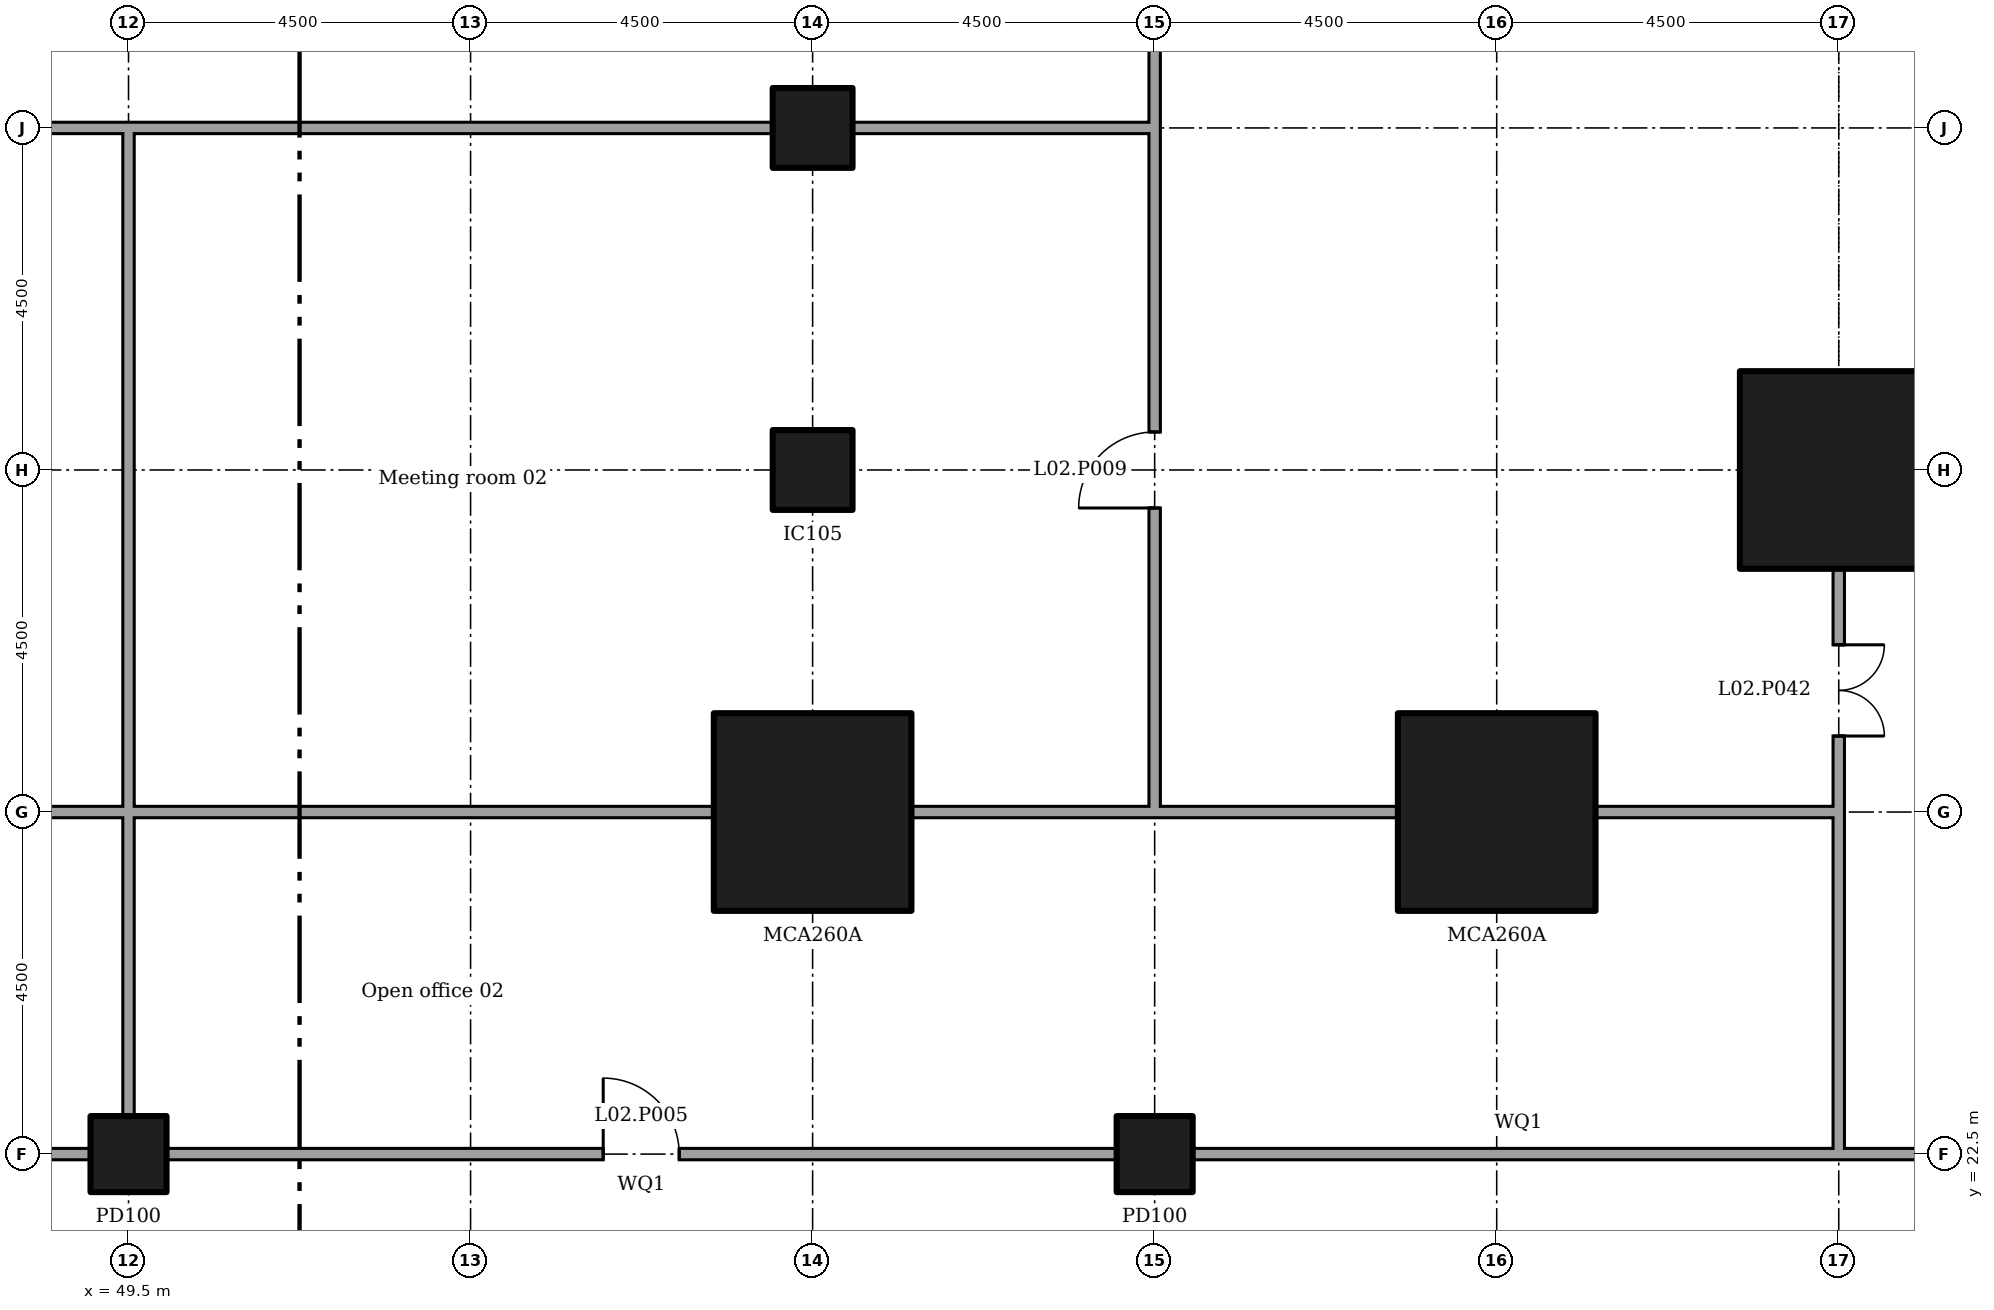
"""IFC4 building model, lengths in metres.
Left out: names, types, materials, properties, quantities, classifications, styles, units other than length and angle.
Written with IfcOpenShell. Run it as: python <this file> out.ifc"""

import sys

from ifc_helpers import new_model, si_unit, direction, frame, frame_2d, origin, origin_2d, place, context, subcontext, project, spatial, rectangle, extrude, element, fill, save


model = new_model("IFC4")
c1 = context("Model", 3, precision=1e-05, world=origin(), true_north=direction((0.0, 1.0)))
c2 = subcontext(c1, "Body", "Model", "MODEL_VIEW")
j1 = project(units=[si_unit("LENGTHUNIT", "METRE"), si_unit("PLANEANGLEUNIT", "RADIAN")], contexts=[c1])
p1 = place(None, origin())
s1 = spatial("IfcSite", under=j1, at=p1, CompositionType="ELEMENT")
p2 = place(p1, origin())
s2 = spatial("IfcBuilding", under=s1, at=p2, CompositionType="ELEMENT")
p3 = place(p2, frame((0.0, 0.0, 11.5)))
s3 = spatial("IfcBuildingStorey", under=s2, at=p3, CompositionType="ELEMENT", Elevation=11.5)
for number, where in (
    (1, (58.5, 27.0, 0.0)),
    (2, (67.5, 27.0, 0.0)),
    (3, (72.0, 31.5, 0.0)),
):
    element("IfcColumn", number, at=place(p3, frame(where)), inside=s3, PredefinedType="COLUMN", context=c2, shape_type="SweptSolid", body=[
        extrude(rectangle(XDim=2.6, YDim=2.6, at=origin_2d()), origin(), (0.0, 0.0, 1.0), 5.0),
    ])
for number, where in (
    (4, (58.5, 31.5, 0.0)),
    (5, (58.5, 36.0, 0.0)),
):
    element("IfcColumn", number, at=place(p3, frame(where)), inside=s3, PredefinedType="COLUMN", context=c2, shape_type="SweptSolid", body=[
        extrude(rectangle(XDim=1.05, YDim=1.05, at=origin_2d()), origin(), (0.0, 0.0, 1.0), 5.0),
    ])
for number, where in (
    (6, (49.5, 22.5, 0.0)),
    (7, (63.0, 22.5, 0.0)),
):
    element("IfcColumn", number, at=place(p3, frame(where)), inside=s3, PredefinedType="COLUMN", context=c2, shape_type="SweptSolid", body=[
        extrude(rectangle(XDim=1.0, YDim=1.0, at=origin_2d()), origin(), (0.0, 0.0, 1.0), 5.0),
    ])
p4 = place(p2, frame((0.0, 0.0, 6.0)))
s4 = spatial("IfcBuildingStorey", under=s2, at=p4, CompositionType="ELEMENT", Elevation=6.0)
p5 = place(p4, frame((72.0, 32.795, 0.0), z_axis=(0.0, 0.0, 1.0), x_axis=(0.0, 1.0, 0.0)))
e8 = element("IfcWall", 8, at=p5, inside=s4, PredefinedType="SOLIDWALL", context=c2, shape_type="SweptSolid", body=[
    extrude(rectangle(XDim=10.91, YDim=0.3, at=frame_2d((5.455, 0.0))), origin(), (0.0, 0.0, 1.0), 10.05),
])
p6 = place(p5, frame((4.55, 0.0, 0.0)))
e9 = element("IfcOpeningElement", 9, at=p6, cuts=e8, PredefinedType="OPENING", context=c2, shape_type="SweptSolid", body=[
    extrude(rectangle(XDim=1.8, YDim=2.1, at=frame_2d((0.9, 1.05))), frame((0.0, 0.16, 0.0), z_axis=(0.0, -1.0, 0.0), x_axis=(1.0, 0.0, 0.0)), (0.0, 0.0, 1.0), 0.32),
])
p7 = place(p3, frame((36.495, 22.5, 0.0)))
e10 = element("IfcWall", 10, at=p7, inside=s3, PredefinedType="PARTITIONING", context=c2, shape_type="SweptSolid", body=[
    extrude(rectangle(XDim=12.51, YDim=0.15, at=frame_2d((6.255, 0.0))), origin(), (0.0, 0.0, 1.0), 4.55),
])
p8 = place(p7, frame((5.75, 0.0, 0.0)))
e11 = element("IfcOpeningElement", 11, at=p8, cuts=e10, PredefinedType="OPENING", context=c2, shape_type="SweptSolid", body=[
    extrude(rectangle(XDim=1.0, YDim=2.1, at=frame_2d((0.5, 1.05))), frame((0.0, 0.085, 0.0), z_axis=(0.0, -1.0, 0.0), x_axis=(1.0, 0.0, 0.0)), (0.0, 0.0, 1.0), 0.17),
])
p9 = place(p3, frame((49.995, 22.5, 0.0)))
e12 = element("IfcWall", 12, at=p9, inside=s3, PredefinedType="PARTITIONING", context=c2, shape_type="SweptSolid", body=[
    extrude(rectangle(XDim=12.51, YDim=0.15, at=frame_2d((6.255, 0.0))), origin(), (0.0, 0.0, 1.0), 4.55),
])
p10 = place(p9, frame((5.75, 0.0, 0.0)))
e13 = element("IfcOpeningElement", 13, at=p10, cuts=e12, PredefinedType="OPENING", context=c2, shape_type="SweptSolid", body=[
    extrude(rectangle(XDim=1.0, YDim=2.1, at=frame_2d((0.5, 1.05))), frame((0.0, 0.085, 0.0), z_axis=(0.0, -1.0, 0.0), x_axis=(1.0, 0.0, 0.0)), (0.0, 0.0, 1.0), 0.17),
])
p11 = place(p3, frame((63.495, 22.5, 0.0)))
e14 = element("IfcWall", 14, at=p11, inside=s3, PredefinedType="PARTITIONING", context=c2, shape_type="SweptSolid", body=[
    extrude(rectangle(XDim=8.58, YDim=0.15, at=frame_2d((4.29, 0.0))), origin(), (0.0, 0.0, 1.0), 4.55),
])
p12 = place(p3, frame((72.0, 22.5, 0.0)))
e15 = element("IfcWall", 15, at=p12, inside=s3, PredefinedType="PARTITIONING", context=c2, shape_type="SweptSolid", body=[
    extrude(rectangle(XDim=4.005, YDim=0.15, at=frame_2d((2.002, 0.0))), origin(), (0.0, 0.0, 1.0), 4.55),
])
p13 = place(p12, frame((1.1, 0.0, 0.0)))
e16 = element("IfcOpeningElement", 16, at=p13, cuts=e15, PredefinedType="OPENING", context=c2, shape_type="SweptSolid", body=[
    extrude(rectangle(XDim=1.8, YDim=2.1, at=frame_2d((0.9, 1.05))), frame((0.0, 0.085, 0.0), z_axis=(0.0, -1.0, 0.0), x_axis=(1.0, 0.0, 0.0)), (0.0, 0.0, 1.0), 0.17),
])
p14 = place(p3, frame((49.5, 22.995, 0.0), z_axis=(0.0, 0.0, 1.0), x_axis=(0.0, 1.0, 0.0)))
e17 = element("IfcWall", 17, at=p14, inside=s3, PredefinedType="PARTITIONING", context=c2, shape_type="SweptSolid", body=[
    extrude(rectangle(XDim=4.08, YDim=0.15, at=frame_2d((2.04, 0.0))), origin(), (0.0, 0.0, 1.0), 4.55),
])
for number, where in (
    (18, (46.295, 27.0, 0.0)),
    (19, (62.925, 27.0, 0.0)),
    (20, (68.795, 27.0, 0.0)),
):
    element("IfcWall", number, at=place(p3, frame(where)), inside=s3, PredefinedType="PARTITIONING", context=c2, shape_type="SweptSolid", body=[
        extrude(rectangle(XDim=3.28, YDim=0.15, at=frame_2d((1.64, 0.0))), origin(), (0.0, 0.0, 1.0), 4.55),
    ])
p15 = place(p3, frame((49.575, 27.0, 0.0)))
e21 = element("IfcWall", 21, at=p15, inside=s3, PredefinedType="PARTITIONING", context=c2, shape_type="SweptSolid", body=[
    extrude(rectangle(XDim=7.63, YDim=0.15, at=frame_2d((3.815, 0.0))), origin(), (0.0, 0.0, 1.0), 4.55),
])
p16 = place(p3, frame((59.795, 27.0, 0.0)))
e22 = element("IfcWall", 22, at=p16, inside=s3, PredefinedType="PARTITIONING", context=c2, shape_type="SweptSolid", body=[
    extrude(rectangle(XDim=3.205, YDim=0.15, at=frame_2d((1.603, 0.0))), origin(), (0.0, 0.0, 1.0), 4.55),
])
p17 = place(p3, frame((72.0, 22.575, 0.0), z_axis=(0.0, 0.0, 1.0), x_axis=(0.0, 1.0, 0.0)))
e23 = element("IfcWall", 23, at=p17, inside=s3, PredefinedType="PARTITIONING", context=c2, shape_type="SweptSolid", body=[
    extrude(rectangle(XDim=4.35, YDim=0.15, at=frame_2d((2.175, 0.0))), origin(), (0.0, 0.0, 1.0), 4.55),
])
p18 = place(p3, frame((63.0, 27.075, 0.0), z_axis=(0.0, 0.0, 1.0), x_axis=(0.0, 1.0, 0.0)))
e24 = element("IfcWall", 24, at=p18, inside=s3, PredefinedType="PARTITIONING", context=c2, shape_type="SweptSolid", body=[
    extrude(rectangle(XDim=9.0, YDim=0.15, at=frame_2d((4.5, 0.0))), origin(), (0.0, 0.0, 1.0), 4.55),
])
p19 = place(p18, frame((3.925, 0.0, 0.0)))
e25 = element("IfcOpeningElement", 25, at=p19, cuts=e24, PredefinedType="OPENING", context=c2, shape_type="SweptSolid", body=[
    extrude(rectangle(XDim=1.0, YDim=2.1, at=frame_2d((0.5, 1.05))), frame((0.0, 0.085, 0.0), z_axis=(0.0, -1.0, 0.0), x_axis=(1.0, 0.0, 0.0)), (0.0, 0.0, 1.0), 0.17),
])
p20 = place(p3, frame((63.0, 36.0, 0.0), z_axis=(0.0, 0.0, 1.0), x_axis=(0.0, 1.0, 0.0)))
e26 = element("IfcWall", 26, at=p20, inside=s3, PredefinedType="PARTITIONING", context=c2, shape_type="SweptSolid", body=[
    extrude(rectangle(XDim=21.98, YDim=0.15, at=frame_2d((10.99, 0.0))), origin(), (0.0, 0.0, 1.0), 4.55),
])
p21 = place(p20, frame((10.1, 0.0, 0.0)))
e27 = element("IfcOpeningElement", 27, at=p21, cuts=e26, PredefinedType="OPENING", context=c2, shape_type="SweptSolid", body=[
    extrude(rectangle(XDim=1.8, YDim=2.1, at=frame_2d((0.9, 1.05))), frame((0.0, 0.085, 0.0), z_axis=(0.0, -1.0, 0.0), x_axis=(1.0, 0.0, 0.0)), (0.0, 0.0, 1.0), 0.17),
])
p22 = place(p3, frame((72.0, 27.0, 0.0), z_axis=(0.0, 0.0, 1.0), x_axis=(0.0, 1.0, 0.0)))
e28 = element("IfcWall", 28, at=p22, inside=s3, PredefinedType="PARTITIONING", context=c2, shape_type="SweptSolid", body=[
    extrude(rectangle(XDim=3.205, YDim=0.15, at=frame_2d((1.603, 0.0))), origin(), (0.0, 0.0, 1.0), 4.55),
])
p23 = place(p22, frame((1.0, 0.0, 0.0)))
e29 = element("IfcOpeningElement", 29, at=p23, cuts=e28, PredefinedType="OPENING", context=c2, shape_type="SweptSolid", body=[
    extrude(rectangle(XDim=1.2, YDim=2.1, at=frame_2d((0.6, 1.05))), frame((0.0, 0.085, 0.0), z_axis=(0.0, -1.0, 0.0), x_axis=(1.0, 0.0, 0.0)), (0.0, 0.0, 1.0), 0.17),
])
p24 = place(p3, frame((49.5, 27.075, 0.0), z_axis=(0.0, 0.0, 1.0), x_axis=(0.0, 1.0, 0.0)))
e30 = element("IfcWall", 30, at=p24, inside=s3, PredefinedType="PARTITIONING", context=c2, shape_type="SweptSolid", body=[
    extrude(rectangle(XDim=9.0, YDim=0.15, at=frame_2d((4.5, 0.0))), origin(), (0.0, 0.0, 1.0), 4.55),
])
p25 = place(p3, frame((36.075, 36.0, 0.0)))
e31 = element("IfcWall", 31, at=p25, inside=s3, PredefinedType="PARTITIONING", context=c2, shape_type="SweptSolid", body=[
    extrude(rectangle(XDim=13.425, YDim=0.15, at=frame_2d((6.712, 0.0))), origin(), (0.0, 0.0, 1.0), 4.55),
])
p26 = place(p25, frame((6.175, 0.0, 0.0)))
e32 = element("IfcOpeningElement", 32, at=p26, cuts=e31, PredefinedType="OPENING", context=c2, shape_type="SweptSolid", body=[
    extrude(rectangle(XDim=1.0, YDim=2.1, at=frame_2d((0.5, 1.05))), frame((0.0, 0.085, 0.0), z_axis=(0.0, -1.0, 0.0), x_axis=(1.0, 0.0, 0.0)), (0.0, 0.0, 1.0), 0.17),
])
p27 = place(p3, frame((49.575, 36.0, 0.0)))
e33 = element("IfcWall", 33, at=p27, inside=s3, PredefinedType="PARTITIONING", context=c2, shape_type="SweptSolid", body=[
    extrude(rectangle(XDim=8.405, YDim=0.15, at=frame_2d((4.203, 0.0))), origin(), (0.0, 0.0, 1.0), 4.55),
])
p28 = place(p3, frame((59.02, 36.0, 0.0)))
e34 = element("IfcWall", 34, at=p28, inside=s3, PredefinedType="PARTITIONING", context=c2, shape_type="SweptSolid", body=[
    extrude(rectangle(XDim=3.905, YDim=0.15, at=frame_2d((1.953, 0.0))), origin(), (0.0, 0.0, 1.0), 4.55),
])
p29 = place(p10, origin())
e35 = element("IfcDoor", 35, at=p29, inside=s3, OperationType="SINGLE_SWING_RIGHT", PredefinedType="DOOR", context=c2, shape_type="SweptSolid", body=[
    extrude(rectangle(XDim=1.0, YDim=2.1, at=frame_2d((0.5, 1.05))), frame((0.0, 0.025, 0.0), z_axis=(0.0, -1.0, 0.0), x_axis=(1.0, 0.0, 0.0)), (0.0, 0.0, 1.0), 0.05),
])
fill(e13, e35)
p30 = place(p19, origin())
e36 = element("IfcDoor", 36, at=p30, inside=s3, OperationType="SINGLE_SWING_RIGHT", PredefinedType="DOOR", context=c2, shape_type="SweptSolid", body=[
    extrude(rectangle(XDim=1.0, YDim=2.1, at=frame_2d((0.5, 1.05))), frame((0.0, 0.025, 0.0), z_axis=(0.0, -1.0, 0.0), x_axis=(1.0, 0.0, 0.0)), (0.0, 0.0, 1.0), 0.05),
])
fill(e25, e36)
p31 = place(p23, frame((1.2, 0.0, 0.0), x_axis=(-1.0, 0.0, 0.0)))
e37 = element("IfcDoor", 37, at=p31, inside=s3, OperationType="DOUBLE_DOOR_SINGLE_SWING", PredefinedType="DOOR", context=c2, shape_type="SweptSolid", body=[
    extrude(rectangle(XDim=1.2, YDim=2.1, at=frame_2d((0.6, 1.05))), frame((0.0, 0.025, 0.0), z_axis=(0.0, -1.0, 0.0), x_axis=(1.0, 0.0, 0.0)), (0.0, 0.0, 1.0), 0.05),
])
fill(e29, e37)
save(model, sys.argv[1])
